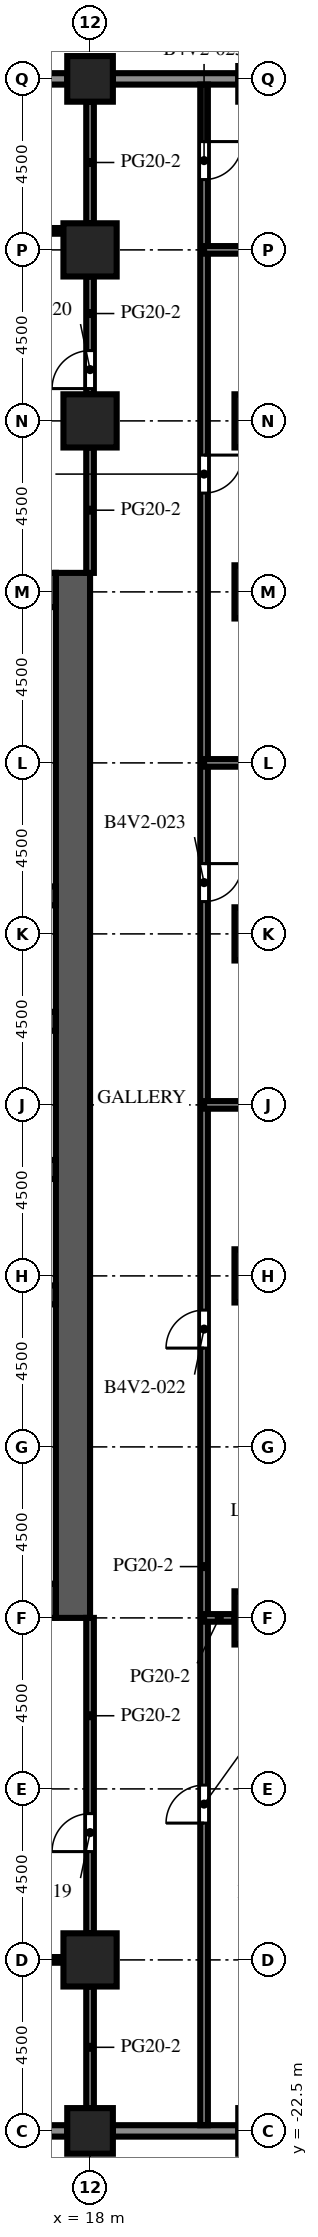
"""IFC4 building model, lengths in metres.
Left out: names, types, materials, properties, quantities, classifications, styles, units other than length and angle.
Written with IfcOpenShell. Run it as: python <this file> out.ifc"""

import sys

from ifc_helpers import new_model, si_unit, direction, frame, frame_2d, origin, origin_2d, place, context, subcontext, project, spatial, rectangle, extrude, element, fill, save


model = new_model("IFC4")
c1 = context("Model", 3, precision=1e-05, world=origin(), true_north=direction((0.0, 1.0)))
c2 = subcontext(c1, "Body", "Model", "MODEL_VIEW")
j1 = project(units=[si_unit("LENGTHUNIT", "METRE"), si_unit("PLANEANGLEUNIT", "RADIAN")], contexts=[c1])
p1 = place(None, origin())
s1 = spatial("IfcSite", under=j1, at=p1, CompositionType="ELEMENT")
p2 = place(p1, origin())
s2 = spatial("IfcBuilding", under=s1, at=p2, CompositionType="ELEMENT")
p3 = place(p2, frame((0.0, 0.0, 141.3)))
s3 = spatial("IfcBuildingStorey", under=s2, at=p3, CompositionType="ELEMENT", Elevation=141.3)
for number, where, z_axis, x_axis in (
    (1, (18.0, -22.5, 0.0), (0.0, 0.0, 1.0), (1.0, 0.0, 0.0)),
    (2, (18.0, 31.5, 0.0), (0.0, 0.0, 1.0), (1.0, 0.0, 0.0)),
):
    element("IfcColumn", number, at=place(p3, frame(where, z_axis=z_axis, x_axis=x_axis)), inside=s3, PredefinedType="COLUMN", context=c2, shape_type="SweptSolid", body=[
        extrude(rectangle(XDim=1.2, YDim=1.2, at=origin_2d()), origin(), (0.0, 0.0, 1.0), 4.1),
    ])
for number, where, z_axis, x_axis in (
    (3, (18.0, -18.0, 0.0), (0.0, 0.0, 1.0), (1.0, 0.0, 0.0)),
    (4, (18.0, 22.5, 0.0), (0.0, 0.0, 1.0), (1.0, 0.0, 0.0)),
    (5, (18.0, 27.0, 0.0), (0.0, 0.0, 1.0), (1.0, 0.0, 0.0)),
    (6, (22.5, -9.0, 0.0), (0.0, 0.0, 1.0), (1.0, 0.0, 0.0)),
    (7, (22.5, 0.0, 0.0), (0.0, 0.0, 1.0), (1.0, 0.0, 0.0)),
    (8, (22.5, 9.0, 0.0), (0.0, 0.0, 1.0), (1.0, 0.0, 0.0)),
    (9, (22.5, 18.0, 0.0), (0.0, 0.0, 1.0), (1.0, 0.0, 0.0)),
    (10, (22.5, 22.5, 0.0), (0.0, 0.0, 1.0), (1.0, 0.0, 0.0)),
):
    element("IfcColumn", number, at=place(p3, frame(where, z_axis=z_axis, x_axis=x_axis)), inside=s3, PredefinedType="COLUMN", context=c2, shape_type="SweptSolid", body=[
        extrude(rectangle(XDim=1.4, YDim=1.4, at=origin_2d()), origin(), (0.0, 0.0, 1.0), 4.1),
    ])
p4 = place(p3, frame((17.55, -9.0, 0.0), z_axis=(0.0, 0.0, 1.0), x_axis=(0.0, 1.0, 0.0)))
e11 = element("IfcWall", 11, at=p4, inside=s3, PredefinedType="SHEAR", context=c2, shape_type="SweptSolid", body=[
    extrude(rectangle(XDim=27.5, YDim=0.9, at=frame_2d((13.75, 0.0))), origin(), (0.0, 0.0, 1.0), 4.1),
])
p5 = place(p4, frame((12.55, 0.0, 0.0)))
e12 = element("IfcOpeningElement", 12, at=p5, cuts=e11, PredefinedType="OPENING", context=c2, shape_type="SweptSolid", body=[
    extrude(rectangle(XDim=2.4, YDim=2.4, at=frame_2d((1.2, 1.2))), frame((0.0, 0.46, 0.0), z_axis=(0.0, -1.0, 0.0), x_axis=(1.0, 0.0, 0.0)), (0.0, 0.0, 1.0), 0.92),
])
p6 = place(p4, frame((6.825, 0.0, 0.0)))
e13 = element("IfcOpeningElement", 13, at=p6, cuts=e11, PredefinedType="OPENING", context=c2, shape_type="SweptSolid", body=[
    extrude(rectangle(XDim=1.2, YDim=2.1, at=frame_2d((0.6, 1.05))), frame((0.0, 0.46, 0.0), z_axis=(0.0, -1.0, 0.0), x_axis=(1.0, 0.0, 0.0)), (0.0, 0.0, 1.0), 0.92),
])
p7 = place(p4, frame((19.475, 0.0, 0.0)))
e14 = element("IfcOpeningElement", 14, at=p7, cuts=e11, PredefinedType="OPENING", context=c2, shape_type="SweptSolid", body=[
    extrude(rectangle(XDim=1.2, YDim=2.1, at=frame_2d((0.6, 1.05))), frame((0.0, 0.46, 0.0), z_axis=(0.0, -1.0, 0.0), x_axis=(1.0, 0.0, 0.0)), (0.0, 0.0, 1.0), 0.92),
])
for number, where, z_axis, x_axis in (
    (15, (6.9, -8.55, 0.0), (0.0, 0.0, 1.0), (1.0, 0.0, 0.0)),
    (16, (6.9, 18.05, 0.0), (0.0, 0.0, 1.0), (1.0, 0.0, 0.0)),
):
    element("IfcWall", number, at=place(p3, frame(where, z_axis=z_axis, x_axis=x_axis)), inside=s3, PredefinedType="SHEAR", context=c2, shape_type="SweptSolid", body=[
        extrude(rectangle(XDim=10.2, YDim=0.9, at=frame_2d((5.1, 0.0))), origin(), (0.0, 0.0, 1.0), 4.1),
    ])
p8 = place(p3, frame((6.9, -0.5, 0.0), z_axis=(0.0, 0.0, 1.0), x_axis=(1.0, 0.0, 0.0)))
e17 = element("IfcWall", 17, at=p8, inside=s3, PredefinedType="SHEAR", context=c2, shape_type="SweptSolid", body=[
    extrude(rectangle(XDim=10.2, YDim=0.5, at=frame_2d((5.1, 0.0))), origin(), (0.0, 0.0, 1.0), 4.1),
])
p9 = place(p3, frame((6.9, 2.8, 0.0), z_axis=(0.0, 0.0, 1.0), x_axis=(1.0, 0.0, 0.0)))
e18 = element("IfcWall", 18, at=p9, inside=s3, PredefinedType="SHEAR", context=c2, shape_type="SweptSolid", body=[
    extrude(rectangle(XDim=10.2, YDim=0.5, at=frame_2d((5.1, 0.0))), origin(), (0.0, 0.0, 1.0), 4.1),
])
p10 = place(p9, frame((0.562, 0.0, 0.0)))
e19 = element("IfcOpeningElement", 19, at=p10, cuts=e18, PredefinedType="OPENING", context=c2, shape_type="SweptSolid", body=[
    extrude(rectangle(XDim=1.1, YDim=2.1, at=frame_2d((0.55, 1.05))), frame((0.0, 0.26, 0.0), z_axis=(0.0, -1.0, 0.0), x_axis=(1.0, 0.0, 0.0)), (0.0, 0.0, 1.0), 0.52),
])
p11 = place(p9, frame((3.238, 0.0, 0.0)))
e20 = element("IfcOpeningElement", 20, at=p11, cuts=e18, PredefinedType="OPENING", context=c2, shape_type="SweptSolid", body=[
    extrude(rectangle(XDim=1.1, YDim=2.1, at=frame_2d((0.55, 1.05))), frame((0.0, 0.26, 0.0), z_axis=(0.0, -1.0, 0.0), x_axis=(1.0, 0.0, 0.0)), (0.0, 0.0, 1.0), 0.52),
])
p12 = place(p9, frame((8.538, 0.0, 0.0)))
e21 = element("IfcOpeningElement", 21, at=p12, cuts=e18, PredefinedType="OPENING", context=c2, shape_type="SweptSolid", body=[
    extrude(rectangle(XDim=1.1, YDim=2.1, at=frame_2d((0.55, 1.05))), frame((0.0, 0.26, 0.0), z_axis=(0.0, -1.0, 0.0), x_axis=(1.0, 0.0, 0.0)), (0.0, 0.0, 1.0), 0.52),
])
p13 = place(p3, frame((6.9, 6.7, 0.0), z_axis=(0.0, 0.0, 1.0), x_axis=(1.0, 0.0, 0.0)))
e22 = element("IfcWall", 22, at=p13, inside=s3, PredefinedType="SHEAR", context=c2, shape_type="SweptSolid", body=[
    extrude(rectangle(XDim=10.2, YDim=0.5, at=frame_2d((5.1, 0.0))), origin(), (0.0, 0.0, 1.0), 4.1),
])
p14 = place(p13, frame((0.562, 0.0, 0.0)))
e23 = element("IfcOpeningElement", 23, at=p14, cuts=e22, PredefinedType="OPENING", context=c2, shape_type="SweptSolid", body=[
    extrude(rectangle(XDim=1.1, YDim=2.1, at=frame_2d((0.55, 1.05))), frame((0.0, 0.26, 0.0), z_axis=(0.0, -1.0, 0.0), x_axis=(1.0, 0.0, 0.0)), (0.0, 0.0, 1.0), 0.52),
])
p15 = place(p13, frame((3.288, 0.0, 0.0)))
e24 = element("IfcOpeningElement", 24, at=p15, cuts=e22, PredefinedType="OPENING", context=c2, shape_type="SweptSolid", body=[
    extrude(rectangle(XDim=1.0, YDim=2.1, at=frame_2d((0.5, 1.05))), frame((0.0, 0.26, 0.0), z_axis=(0.0, -1.0, 0.0), x_axis=(1.0, 0.0, 0.0)), (0.0, 0.0, 1.0), 0.52),
])
p16 = place(p13, frame((5.913, 0.0, 0.0)))
e25 = element("IfcOpeningElement", 25, at=p16, cuts=e22, PredefinedType="OPENING", context=c2, shape_type="SweptSolid", body=[
    extrude(rectangle(XDim=1.0, YDim=2.1, at=frame_2d((0.5, 1.05))), frame((0.0, 0.26, 0.0), z_axis=(0.0, -1.0, 0.0), x_axis=(1.0, 0.0, 0.0)), (0.0, 0.0, 1.0), 0.52),
])
p17 = place(p13, frame((8.587, 0.0, 0.0)))
e26 = element("IfcOpeningElement", 26, at=p17, cuts=e22, PredefinedType="OPENING", context=c2, shape_type="SweptSolid", body=[
    extrude(rectangle(XDim=1.0, YDim=2.1, at=frame_2d((0.5, 1.05))), frame((0.0, 0.26, 0.0), z_axis=(0.0, -1.0, 0.0), x_axis=(1.0, 0.0, 0.0)), (0.0, 0.0, 1.0), 0.52),
])
p18 = place(p3, frame((6.9, 10.0, 0.0), z_axis=(0.0, 0.0, 1.0), x_axis=(1.0, 0.0, 0.0)))
e27 = element("IfcWall", 27, at=p18, inside=s3, PredefinedType="SHEAR", context=c2, shape_type="SweptSolid", body=[
    extrude(rectangle(XDim=10.2, YDim=0.5, at=frame_2d((5.1, 0.0))), origin(), (0.0, 0.0, 1.0), 4.1),
])
p19 = place(p3, frame((17.4, -22.5, 0.0), z_axis=(0.0, 0.0, 1.0), x_axis=(-1.0, 0.0, 0.0)))
e28 = element("IfcWall", 28, at=p19, inside=s3, PredefinedType="SOLIDWALL", context=c2, shape_type="SweptSolid", body=[
    extrude(rectangle(XDim=3.3, YDim=0.3, at=frame_2d((1.65, 0.0))), origin(), (0.0, 0.0, 1.0), 2.6),
])
p20 = place(p19, frame((1.15, 0.0, 0.0)))
e29 = element("IfcOpeningElement", 29, at=p20, cuts=e28, PredefinedType="OPENING", context=c2, shape_type="SweptSolid", body=[
    extrude(rectangle(XDim=1.0, YDim=2.2, at=frame_2d((0.5, 1.1))), frame((0.0, 0.16, 0.0), z_axis=(0.0, -1.0, 0.0), x_axis=(1.0, 0.0, 0.0)), (0.0, 0.0, 1.0), 0.32),
])
for number, where, z_axis, x_axis in (
    (30, (21.9, -22.5, 0.0), (0.0, 0.0, 1.0), (-1.0, 0.0, 0.0)),
    (31, (18.6, 31.5, 0.0), (0.0, 0.0, 1.0), (1.0, 0.0, 0.0)),
):
    element("IfcWall", number, at=place(p3, frame(where, z_axis=z_axis, x_axis=x_axis)), inside=s3, PredefinedType="SOLIDWALL", context=c2, shape_type="SweptSolid", body=[
        extrude(rectangle(XDim=3.3, YDim=0.3, at=frame_2d((1.65, 0.0))), origin(), (0.0, 0.0, 1.0), 2.6),
    ])
p21 = place(p3, frame((14.1, 31.5, 0.0), z_axis=(0.0, 0.0, 1.0), x_axis=(1.0, 0.0, 0.0)))
e32 = element("IfcWall", 32, at=p21, inside=s3, PredefinedType="SOLIDWALL", context=c2, shape_type="SweptSolid", body=[
    extrude(rectangle(XDim=3.3, YDim=0.3, at=frame_2d((1.65, 0.0))), origin(), (0.0, 0.0, 1.0), 2.6),
])
p22 = place(p21, frame((1.15, 0.0, 0.0)))
e33 = element("IfcOpeningElement", 33, at=p22, cuts=e32, PredefinedType="OPENING", context=c2, shape_type="SweptSolid", body=[
    extrude(rectangle(XDim=1.0, YDim=2.2, at=frame_2d((0.5, 1.1))), frame((0.0, 0.16, 0.0), z_axis=(0.0, -1.0, 0.0), x_axis=(1.0, 0.0, 0.0)), (0.0, 0.0, 1.0), 0.32),
])
p23 = place(p3, frame((18.0, -21.9, 0.0), z_axis=(0.0, 0.0, 1.0), x_axis=(0.0, 1.0, 0.0)))
e34 = element("IfcWall", 34, at=p23, inside=s3, PredefinedType="PARTITIONING", context=c2, shape_type="SweptSolid", body=[
    extrude(rectangle(XDim=3.2, YDim=0.2, at=frame_2d((1.6, 0.0))), origin(), (0.0, 0.0, 1.0), 3.5),
])
p24 = place(p3, frame((18.0, -17.3, 0.0), z_axis=(0.0, 0.0, 1.0), x_axis=(0.0, 1.0, 0.0)))
e35 = element("IfcWall", 35, at=p24, inside=s3, PredefinedType="PARTITIONING", context=c2, shape_type="SweptSolid", body=[
    extrude(rectangle(XDim=8.3, YDim=0.2, at=frame_2d((4.15, 0.0))), origin(), (0.0, 0.0, 1.0), 3.5),
])
p25 = place(p24, frame((2.15, 0.0, 0.0)))
e36 = element("IfcOpeningElement", 36, at=p25, cuts=e35, PredefinedType="OPENING", context=c2, shape_type="SweptSolid", body=[
    extrude(rectangle(XDim=1.0, YDim=2.1, at=frame_2d((0.5, 1.05))), frame((0.0, 0.11, 0.0), z_axis=(0.0, -1.0, 0.0), x_axis=(1.0, 0.0, 0.0)), (0.0, 0.0, 1.0), 0.22),
])
p26 = place(p3, frame((18.0, 18.5, 0.0), z_axis=(0.0, 0.0, 1.0), x_axis=(0.0, 1.0, 0.0)))
e37 = element("IfcWall", 37, at=p26, inside=s3, PredefinedType="PARTITIONING", context=c2, shape_type="SweptSolid", body=[
    extrude(rectangle(XDim=3.3, YDim=0.2, at=frame_2d((1.65, 0.0))), origin(), (0.0, 0.0, 1.0), 3.5),
])
p27 = place(p3, frame((18.0, 23.2, 0.0), z_axis=(0.0, 0.0, 1.0), x_axis=(0.0, 1.0, 0.0)))
e38 = element("IfcWall", 38, at=p27, inside=s3, PredefinedType="PARTITIONING", context=c2, shape_type="SweptSolid", body=[
    extrude(rectangle(XDim=3.1, YDim=0.2, at=frame_2d((1.55, 0.0))), origin(), (0.0, 0.0, 1.0), 3.5),
])
p28 = place(p27, frame((0.15, 0.0, 0.0)))
e39 = element("IfcOpeningElement", 39, at=p28, cuts=e38, PredefinedType="OPENING", context=c2, shape_type="SweptSolid", body=[
    extrude(rectangle(XDim=1.0, YDim=2.1, at=frame_2d((0.5, 1.05))), frame((0.0, 0.11, 0.0), z_axis=(0.0, -1.0, 0.0), x_axis=(1.0, 0.0, 0.0)), (0.0, 0.0, 1.0), 0.22),
])
p29 = place(p3, frame((18.0, 27.7, 0.0), z_axis=(0.0, 0.0, 1.0), x_axis=(0.0, 1.0, 0.0)))
e40 = element("IfcWall", 40, at=p29, inside=s3, PredefinedType="PARTITIONING", context=c2, shape_type="SweptSolid", body=[
    extrude(rectangle(XDim=3.2, YDim=0.2, at=frame_2d((1.6, 0.0))), origin(), (0.0, 0.0, 1.0), 3.5),
])
p30 = place(p3, frame((21.0, 31.35, 0.0), z_axis=(0.0, 0.0, 1.0), x_axis=(0.0, -1.0, 0.0)))
e41 = element("IfcWall", 41, at=p30, inside=s3, PredefinedType="PARTITIONING", context=c2, shape_type="SweptSolid", body=[
    extrude(rectangle(XDim=53.7, YDim=0.2, at=frame_2d((26.85, 0.0))), origin(), (0.0, 0.0, 1.0), 3.5),
])
p31 = place(p30, frame((44.75, 0.0, 0.0)))
e42 = element("IfcOpeningElement", 42, at=p31, cuts=e41, PredefinedType="OPENING", context=c2, shape_type="SweptSolid", body=[
    extrude(rectangle(XDim=1.0, YDim=2.1, at=frame_2d((0.5, 1.05))), frame((0.0, 0.11, 0.0), z_axis=(0.0, -1.0, 0.0), x_axis=(1.0, 0.0, 0.0)), (0.0, 0.0, 1.0), 0.22),
])
p32 = place(p30, frame((32.25, 0.0, 0.0)))
e43 = element("IfcOpeningElement", 43, at=p32, cuts=e41, PredefinedType="OPENING", context=c2, shape_type="SweptSolid", body=[
    extrude(rectangle(XDim=1.0, YDim=2.1, at=frame_2d((0.5, 1.05))), frame((0.0, 0.11, 0.0), z_axis=(0.0, -1.0, 0.0), x_axis=(1.0, 0.0, 0.0)), (0.0, 0.0, 1.0), 0.22),
])
p33 = place(p30, frame((20.5, 0.0, 0.0)))
e44 = element("IfcOpeningElement", 44, at=p33, cuts=e41, PredefinedType="OPENING", context=c2, shape_type="SweptSolid", body=[
    extrude(rectangle(XDim=1.0, YDim=2.1, at=frame_2d((0.5, 1.05))), frame((0.0, 0.11, 0.0), z_axis=(0.0, -1.0, 0.0), x_axis=(1.0, 0.0, 0.0)), (0.0, 0.0, 1.0), 0.22),
])
p34 = place(p30, frame((9.75, 0.0, 0.0)))
e45 = element("IfcOpeningElement", 45, at=p34, cuts=e41, PredefinedType="OPENING", context=c2, shape_type="SweptSolid", body=[
    extrude(rectangle(XDim=1.0, YDim=2.1, at=frame_2d((0.5, 1.05))), frame((0.0, 0.11, 0.0), z_axis=(0.0, -1.0, 0.0), x_axis=(1.0, 0.0, 0.0)), (0.0, 0.0, 1.0), 0.22),
])
p35 = place(p30, frame((1.5, 0.0, 0.0)))
e46 = element("IfcOpeningElement", 46, at=p35, cuts=e41, PredefinedType="OPENING", context=c2, shape_type="SweptSolid", body=[
    extrude(rectangle(XDim=1.0, YDim=2.1, at=frame_2d((0.5, 1.05))), frame((0.0, 0.11, 0.0), z_axis=(0.0, -1.0, 0.0), x_axis=(1.0, 0.0, 0.0)), (0.0, 0.0, 1.0), 0.22),
])
p36 = place(p3, frame((17.3, -18.0, 0.0), z_axis=(0.0, 0.0, 1.0), x_axis=(-1.0, 0.0, 0.0)))
e47 = element("IfcWall", 47, at=p36, inside=s3, PredefinedType="PARTITIONING", context=c2, shape_type="SweptSolid", body=[
    extrude(rectangle(XDim=7.6, YDim=0.15, at=frame_2d((3.8, 0.0))), origin(), (0.0, 0.0, 1.0), 3.5),
])
p37 = place(p36, frame((4.95, 0.0, 0.0)))
e48 = element("IfcOpeningElement", 48, at=p37, cuts=e47, PredefinedType="OPENING", context=c2, shape_type="SweptSolid", body=[
    extrude(rectangle(XDim=1.0, YDim=2.1, at=frame_2d((0.5, 1.05))), frame((0.0, 0.085, 0.0), z_axis=(0.0, -1.0, 0.0), x_axis=(1.0, 0.0, 0.0)), (0.0, 0.0, 1.0), 0.17),
])
p38 = place(p3, frame((21.0, -9.0, 0.0), z_axis=(0.0, 0.0, 1.0), x_axis=(1.0, 0.0, 0.0)))
e49 = element("IfcWall", 49, at=p38, inside=s3, PredefinedType="PARTITIONING", context=c2, shape_type="SweptSolid", body=[
    extrude(rectangle(XDim=0.8, YDim=0.2, at=frame_2d((0.4, 0.0))), origin(), (0.0, 0.0, 1.0), 3.5),
])
for number, where, z_axis, x_axis in (
    (50, (21.0, 4.5, 0.0), (0.0, 0.0, 1.0), (1.0, 0.0, 0.0)),
    (51, (21.0, 13.5, 0.0), (0.0, 0.0, 1.0), (1.0, 0.0, 0.0)),
    (52, (21.0, 27.0, 0.0), (0.0, 0.0, 1.0), (1.0, 0.0, 0.0)),
):
    element("IfcWall", number, at=place(p3, frame(where, z_axis=z_axis, x_axis=x_axis)), inside=s3, PredefinedType="PARTITIONING", context=c2, shape_type="SweptSolid", body=[
        extrude(rectangle(XDim=5.4, YDim=0.2, at=frame_2d((2.7, 0.0))), origin(), (0.0, 0.0, 1.0), 3.5),
    ])
p39 = place(p3, frame((9.7, 27.5, 0.0), z_axis=(0.0, 0.0, 1.0), x_axis=(1.0, 0.0, 0.0)))
e53 = element("IfcWall", 53, at=p39, inside=s3, PredefinedType="PARTITIONING", context=c2, shape_type="SweptSolid", body=[
    extrude(rectangle(XDim=7.6, YDim=0.15, at=frame_2d((3.8, 0.0))), origin(), (0.0, 0.0, 1.0), 3.5),
])
p40 = place(p39, frame((0.65, 0.0, 0.0)))
e54 = element("IfcOpeningElement", 54, at=p40, cuts=e53, PredefinedType="OPENING", context=c2, shape_type="SweptSolid", body=[
    extrude(rectangle(XDim=1.0, YDim=2.1, at=frame_2d((0.5, 1.05))), frame((0.0, 0.085, 0.0), z_axis=(0.0, -1.0, 0.0), x_axis=(1.0, 0.0, 0.0)), (0.0, 0.0, 1.0), 0.17),
])
p41 = place(p5, origin())
e55 = element("IfcDoor", 55, at=p41, inside=s3, OperationType="DOUBLE_DOOR_DOUBLE_SWING", PredefinedType="DOOR", context=c2, shape_type="SweptSolid", body=[
    extrude(rectangle(XDim=2.4, YDim=2.4, at=frame_2d((1.2, 1.2))), frame((0.0, 0.025, 0.0), z_axis=(0.0, -1.0, 0.0), x_axis=(1.0, 0.0, 0.0)), (0.0, 0.0, 1.0), 0.05),
])
fill(e12, e55)
p42 = place(p6, frame((1.2, 0.0, 0.0), z_axis=(0.0, 0.0, 1.0), x_axis=(-1.0, 0.0, 0.0)))
e56 = element("IfcDoor", 56, at=p42, inside=s3, OperationType="SINGLE_SWING_LEFT", PredefinedType="DOOR", context=c2, shape_type="SweptSolid", body=[
    extrude(rectangle(XDim=1.2, YDim=2.1, at=frame_2d((0.6, 1.05))), frame((0.0, 0.025, 0.0), z_axis=(0.0, -1.0, 0.0), x_axis=(1.0, 0.0, 0.0)), (0.0, 0.0, 1.0), 0.05),
])
fill(e13, e56)
p43 = place(p7, frame((1.2, 0.0, 0.0), z_axis=(0.0, 0.0, 1.0), x_axis=(-1.0, 0.0, 0.0)))
e57 = element("IfcDoor", 57, at=p43, inside=s3, OperationType="SINGLE_SWING_LEFT", PredefinedType="DOOR", context=c2, shape_type="SweptSolid", body=[
    extrude(rectangle(XDim=1.2, YDim=2.1, at=frame_2d((0.6, 1.05))), frame((0.0, 0.025, 0.0), z_axis=(0.0, -1.0, 0.0), x_axis=(1.0, 0.0, 0.0)), (0.0, 0.0, 1.0), 0.05),
])
fill(e14, e57)
p44 = place(p25, origin())
e58 = element("IfcDoor", 58, at=p44, inside=s3, OperationType="SINGLE_SWING_LEFT", PredefinedType="DOOR", context=c2, shape_type="SweptSolid", body=[
    extrude(rectangle(XDim=1.0, YDim=2.1, at=frame_2d((0.5, 1.05))), frame((0.0, 0.025, 0.0), z_axis=(0.0, -1.0, 0.0), x_axis=(1.0, 0.0, 0.0)), (0.0, 0.0, 1.0), 0.05),
])
fill(e36, e58)
p45 = place(p28, origin())
e59 = element("IfcDoor", 59, at=p45, inside=s3, OperationType="SINGLE_SWING_LEFT", PredefinedType="DOOR", context=c2, shape_type="SweptSolid", body=[
    extrude(rectangle(XDim=1.0, YDim=2.1, at=frame_2d((0.5, 1.05))), frame((0.0, 0.025, 0.0), z_axis=(0.0, -1.0, 0.0), x_axis=(1.0, 0.0, 0.0)), (0.0, 0.0, 1.0), 0.05),
])
fill(e39, e59)
p46 = place(p31, origin())
e60 = element("IfcDoor", 60, at=p46, inside=s3, OperationType="SINGLE_SWING_RIGHT", PredefinedType="DOOR", context=c2, shape_type="SweptSolid", body=[
    extrude(rectangle(XDim=1.0, YDim=2.1, at=frame_2d((0.5, 1.05))), frame((0.0, 0.025, 0.0), z_axis=(0.0, -1.0, 0.0), x_axis=(1.0, 0.0, 0.0)), (0.0, 0.0, 1.0), 0.05),
])
fill(e42, e60)
p47 = place(p32, origin())
e61 = element("IfcDoor", 61, at=p47, inside=s3, OperationType="SINGLE_SWING_RIGHT", PredefinedType="DOOR", context=c2, shape_type="SweptSolid", body=[
    extrude(rectangle(XDim=1.0, YDim=2.1, at=frame_2d((0.5, 1.05))), frame((0.0, 0.025, 0.0), z_axis=(0.0, -1.0, 0.0), x_axis=(1.0, 0.0, 0.0)), (0.0, 0.0, 1.0), 0.05),
])
fill(e43, e61)
p48 = place(p33, origin())
e62 = element("IfcDoor", 62, at=p48, inside=s3, OperationType="SINGLE_SWING_LEFT", PredefinedType="DOOR", context=c2, shape_type="SweptSolid", body=[
    extrude(rectangle(XDim=1.0, YDim=2.1, at=frame_2d((0.5, 1.05))), frame((0.0, 0.025, 0.0), z_axis=(0.0, -1.0, 0.0), x_axis=(1.0, 0.0, 0.0)), (0.0, 0.0, 1.0), 0.05),
])
fill(e44, e62)
p49 = place(p34, origin())
e63 = element("IfcDoor", 63, at=p49, inside=s3, OperationType="SINGLE_SWING_LEFT", PredefinedType="DOOR", context=c2, shape_type="SweptSolid", body=[
    extrude(rectangle(XDim=1.0, YDim=2.1, at=frame_2d((0.5, 1.05))), frame((0.0, 0.025, 0.0), z_axis=(0.0, -1.0, 0.0), x_axis=(1.0, 0.0, 0.0)), (0.0, 0.0, 1.0), 0.05),
])
fill(e45, e63)
p50 = place(p35, origin())
e64 = element("IfcDoor", 64, at=p50, inside=s3, OperationType="SINGLE_SWING_LEFT", PredefinedType="DOOR", context=c2, shape_type="SweptSolid", body=[
    extrude(rectangle(XDim=1.0, YDim=2.1, at=frame_2d((0.5, 1.05))), frame((0.0, 0.025, 0.0), z_axis=(0.0, -1.0, 0.0), x_axis=(1.0, 0.0, 0.0)), (0.0, 0.0, 1.0), 0.05),
])
fill(e46, e64)
save(model, sys.argv[1])
